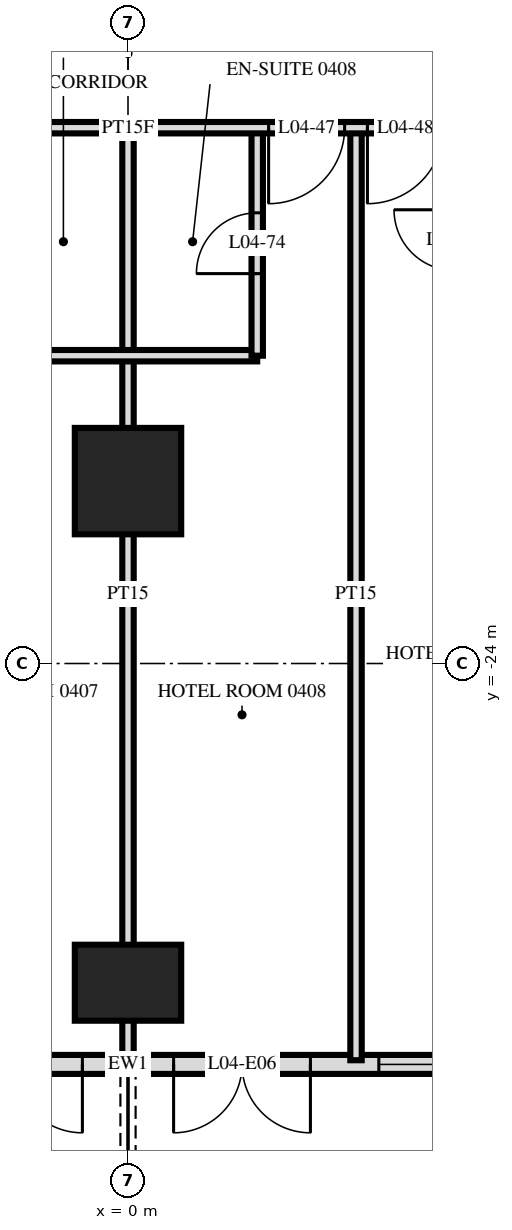
"""IFC4 building model, lengths in metres.
Left out: names, types, materials, properties, quantities, classifications, styles, units other than length and angle.
Written with IfcOpenShell. Run it as: python <this file> out.ifc"""

import sys

from ifc_helpers import new_model, si_unit, direction, frame, frame_2d, origin, origin_2d, place, context, subcontext, project, spatial, rectangle, extrude, element, fill, save


model = new_model("IFC4")
c1 = context("Model", 3, precision=1e-05, world=origin(), true_north=direction((0.0, 1.0)))
c2 = subcontext(c1, "Body", "Model", "MODEL_VIEW")
j1 = project(units=[si_unit("LENGTHUNIT", "METRE"), si_unit("PLANEANGLEUNIT", "RADIAN")], contexts=[c1])
p1 = place(None, origin())
s1 = spatial("IfcSite", under=j1, at=p1, CompositionType="ELEMENT")
p2 = place(p1, origin())
s2 = spatial("IfcBuilding", under=s1, at=p2, CompositionType="ELEMENT")
p3 = place(p2, frame((0.0, 0.0, 24.0)))
s3 = spatial("IfcBuildingStorey", under=s2, at=p3, CompositionType="ELEMENT", Elevation=24.0)
p4 = place(p3, frame((0.0, -28.2, -0.28), z_axis=(0.0, 0.0, 1.0), x_axis=(1.0, 0.0, 0.0)))
e1 = element("IfcColumn", 1, at=p4, inside=s3, PredefinedType="COLUMN", context=c2, shape_type="SweptSolid", body=[
    extrude(rectangle(XDim=1.4, YDim=1.0, at=origin_2d()), origin(), (0.0, 0.0, 1.0), 3.88),
])
p5 = place(p3, frame((0.0, -21.6, -0.28), z_axis=(0.0, 0.0, 1.0), x_axis=(1.0, 0.0, 0.0)))
e2 = element("IfcColumn", 2, at=p5, inside=s3, PredefinedType="COLUMN", context=c2, shape_type="SweptSolid", body=[
    extrude(rectangle(XDim=1.4, YDim=1.4, at=origin_2d()), origin(), (0.0, 0.0, 1.0), 3.88),
])
p6 = place(p3, frame((-28.775, -29.275, 0.0), z_axis=(0.0, 0.0, 1.0), x_axis=(1.0, 0.0, 0.0)))
e3 = element("IfcWall", 3, at=p6, inside=s3, PredefinedType="SOLIDWALL", context=c2, shape_type="SweptSolid", body=[
    extrude(rectangle(XDim=57.551, YDim=0.25, at=frame_2d((28.775, 0.0))), origin(), (0.0, 0.0, 1.0), 3.32),
])
p7 = place(p6, frame((0.575, 0.0, 0.0)))
e4 = element("IfcOpeningElement", 4, at=p7, cuts=e3, PredefinedType="OPENING", context=c2, shape_type="SweptSolid", body=[
    extrude(rectangle(XDim=1.8, YDim=2.4, at=frame_2d((0.9, 1.2))), frame((0.0, 0.135, 0.0), z_axis=(0.0, -1.0, 0.0), x_axis=(1.0, 0.0, 0.0)), (0.0, 0.0, 1.0), 0.27),
])
p8 = place(p6, frame((5.375, 0.0, 0.0)))
e5 = element("IfcOpeningElement", 5, at=p8, cuts=e3, PredefinedType="OPENING", context=c2, shape_type="SweptSolid", body=[
    extrude(rectangle(XDim=1.8, YDim=2.4, at=frame_2d((0.9, 1.2))), frame((0.0, 0.135, 0.0), z_axis=(0.0, -1.0, 0.0), x_axis=(1.0, 0.0, 0.0)), (0.0, 0.0, 1.0), 0.27),
])
p9 = place(p6, frame((8.075, 0.0, 0.3)))
e6 = element("IfcOpeningElement", 6, at=p9, cuts=e3, PredefinedType="OPENING", context=c2, shape_type="SweptSolid", body=[
    extrude(rectangle(XDim=2.4, YDim=2.1, at=frame_2d((1.2, 1.05))), frame((0.0, 0.135, 0.0), z_axis=(0.0, -1.0, 0.0), x_axis=(1.0, 0.0, 0.0)), (0.0, 0.0, 1.0), 0.27),
])
p10 = place(p6, frame((11.375, 0.0, 0.0)))
e7 = element("IfcOpeningElement", 7, at=p10, cuts=e3, PredefinedType="OPENING", context=c2, shape_type="SweptSolid", body=[
    extrude(rectangle(XDim=1.8, YDim=2.4, at=frame_2d((0.9, 1.2))), frame((0.0, 0.135, 0.0), z_axis=(0.0, -1.0, 0.0), x_axis=(1.0, 0.0, 0.0)), (0.0, 0.0, 1.0), 0.27),
])
p11 = place(p6, frame((14.075, 0.0, 0.3)))
e8 = element("IfcOpeningElement", 8, at=p11, cuts=e3, PredefinedType="OPENING", context=c2, shape_type="SweptSolid", body=[
    extrude(rectangle(XDim=2.4, YDim=2.1, at=frame_2d((1.2, 1.05))), frame((0.0, 0.135, 0.0), z_axis=(0.0, -1.0, 0.0), x_axis=(1.0, 0.0, 0.0)), (0.0, 0.0, 1.0), 0.27),
])
p12 = place(p6, frame((17.375, 0.0, 0.0)))
e9 = element("IfcOpeningElement", 9, at=p12, cuts=e3, PredefinedType="OPENING", context=c2, shape_type="SweptSolid", body=[
    extrude(rectangle(XDim=1.8, YDim=2.4, at=frame_2d((0.9, 1.2))), frame((0.0, 0.135, 0.0), z_axis=(0.0, -1.0, 0.0), x_axis=(1.0, 0.0, 0.0)), (0.0, 0.0, 1.0), 0.27),
])
p13 = place(p6, frame((20.075, 0.0, 0.3)))
e10 = element("IfcOpeningElement", 10, at=p13, cuts=e3, PredefinedType="OPENING", context=c2, shape_type="SweptSolid", body=[
    extrude(rectangle(XDim=2.4, YDim=2.1, at=frame_2d((1.2, 1.05))), frame((0.0, 0.135, 0.0), z_axis=(0.0, -1.0, 0.0), x_axis=(1.0, 0.0, 0.0)), (0.0, 0.0, 1.0), 0.27),
])
p14 = place(p6, frame((23.075, 0.0, 0.3)))
e11 = element("IfcOpeningElement", 11, at=p14, cuts=e3, PredefinedType="OPENING", context=c2, shape_type="SweptSolid", body=[
    extrude(rectangle(XDim=2.4, YDim=2.1, at=frame_2d((1.2, 1.05))), frame((0.0, 0.135, 0.0), z_axis=(0.0, -1.0, 0.0), x_axis=(1.0, 0.0, 0.0)), (0.0, 0.0, 1.0), 0.27),
])
p15 = place(p6, frame((26.375, 0.0, 0.0)))
e12 = element("IfcOpeningElement", 12, at=p15, cuts=e3, PredefinedType="OPENING", context=c2, shape_type="SweptSolid", body=[
    extrude(rectangle(XDim=1.8, YDim=2.4, at=frame_2d((0.9, 1.2))), frame((0.0, 0.135, 0.0), z_axis=(0.0, -1.0, 0.0), x_axis=(1.0, 0.0, 0.0)), (0.0, 0.0, 1.0), 0.27),
])
p16 = place(p6, frame((29.375, 0.0, 0.0)))
e13 = element("IfcOpeningElement", 13, at=p16, cuts=e3, PredefinedType="OPENING", context=c2, shape_type="SweptSolid", body=[
    extrude(rectangle(XDim=1.8, YDim=2.4, at=frame_2d((0.9, 1.2))), frame((0.0, 0.135, 0.0), z_axis=(0.0, -1.0, 0.0), x_axis=(1.0, 0.0, 0.0)), (0.0, 0.0, 1.0), 0.27),
])
p17 = place(p6, frame((32.075, 0.0, 0.3)))
e14 = element("IfcOpeningElement", 14, at=p17, cuts=e3, PredefinedType="OPENING", context=c2, shape_type="SweptSolid", body=[
    extrude(rectangle(XDim=2.4, YDim=2.1, at=frame_2d((1.2, 1.05))), frame((0.0, 0.135, 0.0), z_axis=(0.0, -1.0, 0.0), x_axis=(1.0, 0.0, 0.0)), (0.0, 0.0, 1.0), 0.27),
])
p18 = place(p6, frame((35.375, 0.0, 0.0)))
e15 = element("IfcOpeningElement", 15, at=p18, cuts=e3, PredefinedType="OPENING", context=c2, shape_type="SweptSolid", body=[
    extrude(rectangle(XDim=1.8, YDim=2.4, at=frame_2d((0.9, 1.2))), frame((0.0, 0.135, 0.0), z_axis=(0.0, -1.0, 0.0), x_axis=(1.0, 0.0, 0.0)), (0.0, 0.0, 1.0), 0.27),
])
p19 = place(p6, frame((38.075, 0.0, 0.3)))
e16 = element("IfcOpeningElement", 16, at=p19, cuts=e3, PredefinedType="OPENING", context=c2, shape_type="SweptSolid", body=[
    extrude(rectangle(XDim=2.4, YDim=2.1, at=frame_2d((1.2, 1.05))), frame((0.0, 0.135, 0.0), z_axis=(0.0, -1.0, 0.0), x_axis=(1.0, 0.0, 0.0)), (0.0, 0.0, 1.0), 0.27),
])
p20 = place(p6, frame((41.375, 0.0, 0.0)))
e17 = element("IfcOpeningElement", 17, at=p20, cuts=e3, PredefinedType="OPENING", context=c2, shape_type="SweptSolid", body=[
    extrude(rectangle(XDim=1.8, YDim=2.4, at=frame_2d((0.9, 1.2))), frame((0.0, 0.135, 0.0), z_axis=(0.0, -1.0, 0.0), x_axis=(1.0, 0.0, 0.0)), (0.0, 0.0, 1.0), 0.27),
])
p21 = place(p6, frame((44.075, 0.0, 0.3)))
e18 = element("IfcOpeningElement", 18, at=p21, cuts=e3, PredefinedType="OPENING", context=c2, shape_type="SweptSolid", body=[
    extrude(rectangle(XDim=2.4, YDim=2.1, at=frame_2d((1.2, 1.05))), frame((0.0, 0.135, 0.0), z_axis=(0.0, -1.0, 0.0), x_axis=(1.0, 0.0, 0.0)), (0.0, 0.0, 1.0), 0.27),
])
p22 = place(p6, frame((47.075, 0.0, 0.3)))
e19 = element("IfcOpeningElement", 19, at=p22, cuts=e3, PredefinedType="OPENING", context=c2, shape_type="SweptSolid", body=[
    extrude(rectangle(XDim=2.4, YDim=2.1, at=frame_2d((1.2, 1.05))), frame((0.0, 0.135, 0.0), z_axis=(0.0, -1.0, 0.0), x_axis=(1.0, 0.0, 0.0)), (0.0, 0.0, 1.0), 0.27),
])
p23 = place(p6, frame((50.375, 0.0, 0.0)))
e20 = element("IfcOpeningElement", 20, at=p23, cuts=e3, PredefinedType="OPENING", context=c2, shape_type="SweptSolid", body=[
    extrude(rectangle(XDim=1.8, YDim=2.4, at=frame_2d((0.9, 1.2))), frame((0.0, 0.135, 0.0), z_axis=(0.0, -1.0, 0.0), x_axis=(1.0, 0.0, 0.0)), (0.0, 0.0, 1.0), 0.27),
])
p24 = place(p6, frame((53.375, 0.0, 0.0)))
e21 = element("IfcOpeningElement", 21, at=p24, cuts=e3, PredefinedType="OPENING", context=c2, shape_type="SweptSolid", body=[
    extrude(rectangle(XDim=1.8, YDim=2.4, at=frame_2d((0.9, 1.2))), frame((0.0, 0.135, 0.0), z_axis=(0.0, -1.0, 0.0), x_axis=(1.0, 0.0, 0.0)), (0.0, 0.0, 1.0), 0.27),
])
p25 = place(p3, frame((3.0, -29.22, 0.0), z_axis=(0.0, 0.0, 1.0), x_axis=(0.0, 1.0, 0.0)))
e22 = element("IfcWall", 22, at=p25, inside=s3, PredefinedType="PARTITIONING", context=c2, shape_type="SweptSolid", body=[
    extrude(rectangle(XDim=12.27, YDim=0.15, at=frame_2d((6.135, 0.0))), origin(), (0.0, 0.0, 1.0), 3.32),
])
p26 = place(p3, frame((1.7, -19.95, 0.0), z_axis=(0.0, 0.0, 1.0), x_axis=(0.0, 1.0, 0.0)))
e23 = element("IfcWall", 23, at=p26, inside=s3, PredefinedType="PARTITIONING", context=c2, shape_type="SweptSolid", body=[
    extrude(rectangle(XDim=3.0, YDim=0.15, at=frame_2d((1.5, 0.0))), origin(), (0.0, 0.0, 1.0), 3.32),
])
p27 = place(p26, frame((1.08, 0.0, 0.0)))
e24 = element("IfcOpeningElement", 24, at=p27, cuts=e23, PredefinedType="OPENING", context=c2, shape_type="SweptSolid", body=[
    extrude(rectangle(XDim=0.8, YDim=2.1, at=frame_2d((0.4, 1.05))), frame((0.0, 0.085, 0.0), z_axis=(0.0, -1.0, 0.0), x_axis=(1.0, 0.0, 0.0)), (0.0, 0.0, 1.0), 0.17),
])
p28 = place(p3, frame((0.0, -29.22, 0.0), z_axis=(0.0, 0.0, 1.0), x_axis=(0.0, 1.0, 0.0)))
e25 = element("IfcWall", 25, at=p28, inside=s3, PredefinedType="PARTITIONING", context=c2, shape_type="SweptSolid", body=[
    extrude(rectangle(XDim=12.27, YDim=0.15, at=frame_2d((6.135, 0.0))), origin(), (0.0, 0.0, 1.0), 3.32),
])
p29 = place(p3, frame((-1.7, -19.95, 0.0), z_axis=(0.0, 0.0, 1.0), x_axis=(1.0, 0.0, 0.0)))
e26 = element("IfcWall", 26, at=p29, inside=s3, PredefinedType="PARTITIONING", context=c2, shape_type="SweptSolid", body=[
    extrude(rectangle(XDim=3.4, YDim=0.15, at=frame_2d((1.7, 0.0))), origin(), (0.0, 0.0, 1.0), 3.32),
])
p30 = place(p3, frame((-33.12, -16.95, 0.0), z_axis=(0.0, 0.0, 1.0), x_axis=(1.0, 0.0, 0.0)))
e27 = element("IfcWall", 27, at=p30, inside=s3, PredefinedType="PARTITIONING", context=c2, shape_type="SweptSolid", body=[
    extrude(rectangle(XDim=66.24, YDim=0.15, at=frame_2d((33.12, 0.0))), origin(), (0.0, 0.0, 1.0), 3.32),
])
p31 = place(p30, frame((9.27, 0.0, 0.0)))
e28 = element("IfcOpeningElement", 28, at=p31, cuts=e27, PredefinedType="OPENING", context=c2, shape_type="SweptSolid", body=[
    extrude(rectangle(XDim=1.0, YDim=2.1, at=frame_2d((0.5, 1.05))), frame((0.0, 0.085, 0.0), z_axis=(0.0, -1.0, 0.0), x_axis=(1.0, 0.0, 0.0)), (0.0, 0.0, 1.0), 0.17),
])
p32 = place(p30, frame((13.97, 0.0, 0.0)))
e29 = element("IfcOpeningElement", 29, at=p32, cuts=e27, PredefinedType="OPENING", context=c2, shape_type="SweptSolid", body=[
    extrude(rectangle(XDim=1.0, YDim=2.1, at=frame_2d((0.5, 1.05))), frame((0.0, 0.085, 0.0), z_axis=(0.0, -1.0, 0.0), x_axis=(1.0, 0.0, 0.0)), (0.0, 0.0, 1.0), 0.17),
])
p33 = place(p30, frame((15.27, 0.0, 0.0)))
e30 = element("IfcOpeningElement", 30, at=p33, cuts=e27, PredefinedType="OPENING", context=c2, shape_type="SweptSolid", body=[
    extrude(rectangle(XDim=1.0, YDim=2.1, at=frame_2d((0.5, 1.05))), frame((0.0, 0.085, 0.0), z_axis=(0.0, -1.0, 0.0), x_axis=(1.0, 0.0, 0.0)), (0.0, 0.0, 1.0), 0.17),
])
p34 = place(p30, frame((19.97, 0.0, 0.0)))
e31 = element("IfcOpeningElement", 31, at=p34, cuts=e27, PredefinedType="OPENING", context=c2, shape_type="SweptSolid", body=[
    extrude(rectangle(XDim=1.0, YDim=2.1, at=frame_2d((0.5, 1.05))), frame((0.0, 0.085, 0.0), z_axis=(0.0, -1.0, 0.0), x_axis=(1.0, 0.0, 0.0)), (0.0, 0.0, 1.0), 0.17),
])
p35 = place(p30, frame((22.27, 0.0, 0.0)))
e32 = element("IfcOpeningElement", 32, at=p35, cuts=e27, PredefinedType="OPENING", context=c2, shape_type="SweptSolid", body=[
    extrude(rectangle(XDim=1.0, YDim=2.1, at=frame_2d((0.5, 1.05))), frame((0.0, 0.085, 0.0), z_axis=(0.0, -1.0, 0.0), x_axis=(1.0, 0.0, 0.0)), (0.0, 0.0, 1.0), 0.17),
])
p36 = place(p30, frame((28.97, 0.0, 0.0)))
e33 = element("IfcOpeningElement", 33, at=p36, cuts=e27, PredefinedType="OPENING", context=c2, shape_type="SweptSolid", body=[
    extrude(rectangle(XDim=1.0, YDim=2.1, at=frame_2d((0.5, 1.05))), frame((0.0, 0.085, 0.0), z_axis=(0.0, -1.0, 0.0), x_axis=(1.0, 0.0, 0.0)), (0.0, 0.0, 1.0), 0.17),
])
p37 = place(p30, frame((30.27, 0.0, 0.0)))
e34 = element("IfcOpeningElement", 34, at=p37, cuts=e27, PredefinedType="OPENING", context=c2, shape_type="SweptSolid", body=[
    extrude(rectangle(XDim=1.0, YDim=2.1, at=frame_2d((0.5, 1.05))), frame((0.0, 0.085, 0.0), z_axis=(0.0, -1.0, 0.0), x_axis=(1.0, 0.0, 0.0)), (0.0, 0.0, 1.0), 0.17),
])
p38 = place(p30, frame((34.97, 0.0, 0.0)))
e35 = element("IfcOpeningElement", 35, at=p38, cuts=e27, PredefinedType="OPENING", context=c2, shape_type="SweptSolid", body=[
    extrude(rectangle(XDim=1.0, YDim=2.1, at=frame_2d((0.5, 1.05))), frame((0.0, 0.085, 0.0), z_axis=(0.0, -1.0, 0.0), x_axis=(1.0, 0.0, 0.0)), (0.0, 0.0, 1.0), 0.17),
])
p39 = place(p30, frame((36.27, 0.0, 0.0)))
e36 = element("IfcOpeningElement", 36, at=p39, cuts=e27, PredefinedType="OPENING", context=c2, shape_type="SweptSolid", body=[
    extrude(rectangle(XDim=1.0, YDim=2.1, at=frame_2d((0.5, 1.05))), frame((0.0, 0.085, 0.0), z_axis=(0.0, -1.0, 0.0), x_axis=(1.0, 0.0, 0.0)), (0.0, 0.0, 1.0), 0.17),
])
p40 = place(p30, frame((40.97, 0.0, 0.0)))
e37 = element("IfcOpeningElement", 37, at=p40, cuts=e27, PredefinedType="OPENING", context=c2, shape_type="SweptSolid", body=[
    extrude(rectangle(XDim=1.0, YDim=2.1, at=frame_2d((0.5, 1.05))), frame((0.0, 0.085, 0.0), z_axis=(0.0, -1.0, 0.0), x_axis=(1.0, 0.0, 0.0)), (0.0, 0.0, 1.0), 0.17),
])
p41 = place(p30, frame((42.27, 0.0, 0.0)))
e38 = element("IfcOpeningElement", 38, at=p41, cuts=e27, PredefinedType="OPENING", context=c2, shape_type="SweptSolid", body=[
    extrude(rectangle(XDim=1.0, YDim=2.1, at=frame_2d((0.5, 1.05))), frame((0.0, 0.085, 0.0), z_axis=(0.0, -1.0, 0.0), x_axis=(1.0, 0.0, 0.0)), (0.0, 0.0, 1.0), 0.17),
])
p42 = place(p30, frame((46.97, 0.0, 0.0)))
e39 = element("IfcOpeningElement", 39, at=p42, cuts=e27, PredefinedType="OPENING", context=c2, shape_type="SweptSolid", body=[
    extrude(rectangle(XDim=1.0, YDim=2.1, at=frame_2d((0.5, 1.05))), frame((0.0, 0.085, 0.0), z_axis=(0.0, -1.0, 0.0), x_axis=(1.0, 0.0, 0.0)), (0.0, 0.0, 1.0), 0.17),
])
p43 = place(p30, frame((48.27, 0.0, 0.0)))
e40 = element("IfcOpeningElement", 40, at=p43, cuts=e27, PredefinedType="OPENING", context=c2, shape_type="SweptSolid", body=[
    extrude(rectangle(XDim=1.0, YDim=2.1, at=frame_2d((0.5, 1.05))), frame((0.0, 0.085, 0.0), z_axis=(0.0, -1.0, 0.0), x_axis=(1.0, 0.0, 0.0)), (0.0, 0.0, 1.0), 0.17),
])
p44 = place(p30, frame((52.97, 0.0, 0.0)))
e41 = element("IfcOpeningElement", 41, at=p44, cuts=e27, PredefinedType="OPENING", context=c2, shape_type="SweptSolid", body=[
    extrude(rectangle(XDim=1.0, YDim=2.1, at=frame_2d((0.5, 1.05))), frame((0.0, 0.085, 0.0), z_axis=(0.0, -1.0, 0.0), x_axis=(1.0, 0.0, 0.0)), (0.0, 0.0, 1.0), 0.17),
])
p45 = place(p30, frame((54.27, 0.0, 0.0)))
e42 = element("IfcOpeningElement", 42, at=p45, cuts=e27, PredefinedType="OPENING", context=c2, shape_type="SweptSolid", body=[
    extrude(rectangle(XDim=1.0, YDim=2.1, at=frame_2d((0.5, 1.05))), frame((0.0, 0.085, 0.0), z_axis=(0.0, -1.0, 0.0), x_axis=(1.0, 0.0, 0.0)), (0.0, 0.0, 1.0), 0.17),
])
p46 = place(p30, frame((4.4, 0.0, 0.0)))
e43 = element("IfcOpeningElement", 43, at=p46, cuts=e27, PredefinedType="OPENING", context=c2, shape_type="SweptSolid", body=[
    extrude(rectangle(XDim=1.0, YDim=2.1, at=frame_2d((0.5, 1.05))), frame((0.0, 0.085, 0.0), z_axis=(0.0, -1.0, 0.0), x_axis=(1.0, 0.0, 0.0)), (0.0, 0.0, 1.0), 0.17),
])
p47 = place(p30, frame((60.8, 0.0, 0.0)))
e44 = element("IfcOpeningElement", 44, at=p47, cuts=e27, PredefinedType="OPENING", context=c2, shape_type="SweptSolid", body=[
    extrude(rectangle(XDim=1.0, YDim=2.1, at=frame_2d((0.5, 1.05))), frame((0.0, 0.085, 0.0), z_axis=(0.0, -1.0, 0.0), x_axis=(1.0, 0.0, 0.0)), (0.0, 0.0, 1.0), 0.17),
])
p48 = place(p15, frame((0.9, 0.0, 0.0), z_axis=(0.0, 0.0, 1.0), x_axis=(-1.0, 0.0, 0.0)))
e45 = element("IfcDoor", 45, at=p48, inside=s3, OperationType="DOUBLE_DOOR_SINGLE_SWING", PredefinedType="DOOR", context=c2, shape_type="SweptSolid", body=[
    extrude(rectangle(XDim=1.8, YDim=2.4, at=frame_2d((0.0, 1.2))), frame((0.0, -0.025, 0.0), z_axis=(0.0, 1.0, 0.0), x_axis=(-1.0, 0.0, 0.0)), (0.0, 0.0, 1.0), 0.05),
])
fill(e12, e45)
p49 = place(p16, frame((0.9, 0.0, 0.0), z_axis=(0.0, 0.0, 1.0), x_axis=(-1.0, 0.0, 0.0)))
e46 = element("IfcDoor", 46, at=p49, inside=s3, OperationType="DOUBLE_DOOR_SINGLE_SWING", PredefinedType="DOOR", context=c2, shape_type="SweptSolid", body=[
    extrude(rectangle(XDim=1.8, YDim=2.4, at=frame_2d((0.0, 1.2))), frame((0.0, -0.025, 0.0), z_axis=(0.0, 1.0, 0.0), x_axis=(-1.0, 0.0, 0.0)), (0.0, 0.0, 1.0), 0.05),
])
fill(e13, e46)
p50 = place(p17, origin())
e47 = element("IfcWindow", 47, at=p50, inside=s3, PartitioningType="SINGLE_PANEL", PredefinedType="WINDOW", context=c2, shape_type="SweptSolid", body=[
    extrude(rectangle(XDim=2.4, YDim=2.1, at=frame_2d((1.2, 1.05))), frame((0.0, 0.03, 0.0), z_axis=(0.0, -1.0, 0.0), x_axis=(1.0, 0.0, 0.0)), (0.0, 0.0, 1.0), 0.06),
])
fill(e14, e47)
p51 = place(p38, frame((0.5, 0.0, 0.0), z_axis=(0.0, 0.0, 1.0), x_axis=(-1.0, 0.0, 0.0)))
e48 = element("IfcDoor", 48, at=p51, inside=s3, OperationType="SINGLE_SWING_LEFT", PredefinedType="DOOR", context=c2, shape_type="SweptSolid", body=[
    extrude(rectangle(XDim=1.0, YDim=2.1, at=frame_2d((0.0, 1.05))), frame((0.0, -0.025, 0.0), z_axis=(0.0, 1.0, 0.0), x_axis=(-1.0, 0.0, 0.0)), (0.0, 0.0, 1.0), 0.05),
])
fill(e35, e48)
p52 = place(p39, frame((0.5, 0.0, 0.0), z_axis=(0.0, 0.0, 1.0), x_axis=(-1.0, 0.0, 0.0)))
e49 = element("IfcDoor", 49, at=p52, inside=s3, OperationType="SINGLE_SWING_LEFT", PredefinedType="DOOR", context=c2, shape_type="SweptSolid", body=[
    extrude(rectangle(XDim=1.0, YDim=2.1, at=frame_2d((0.0, 1.05))), frame((0.0, -0.025, 0.0), z_axis=(0.0, 1.0, 0.0), x_axis=(-1.0, 0.0, 0.0)), (0.0, 0.0, 1.0), 0.05),
])
fill(e36, e49)
p53 = place(p27, origin())
e50 = element("IfcDoor", 50, at=p53, inside=s3, OperationType="SINGLE_SWING_RIGHT", PredefinedType="DOOR", context=c2, shape_type="SweptSolid", body=[
    extrude(rectangle(XDim=0.8, YDim=2.1, at=frame_2d((0.4, 1.05))), frame((0.0, 0.025, 0.0), z_axis=(0.0, -1.0, 0.0), x_axis=(1.0, 0.0, 0.0)), (0.0, 0.0, 1.0), 0.05),
])
fill(e24, e50)
save(model, sys.argv[1])
